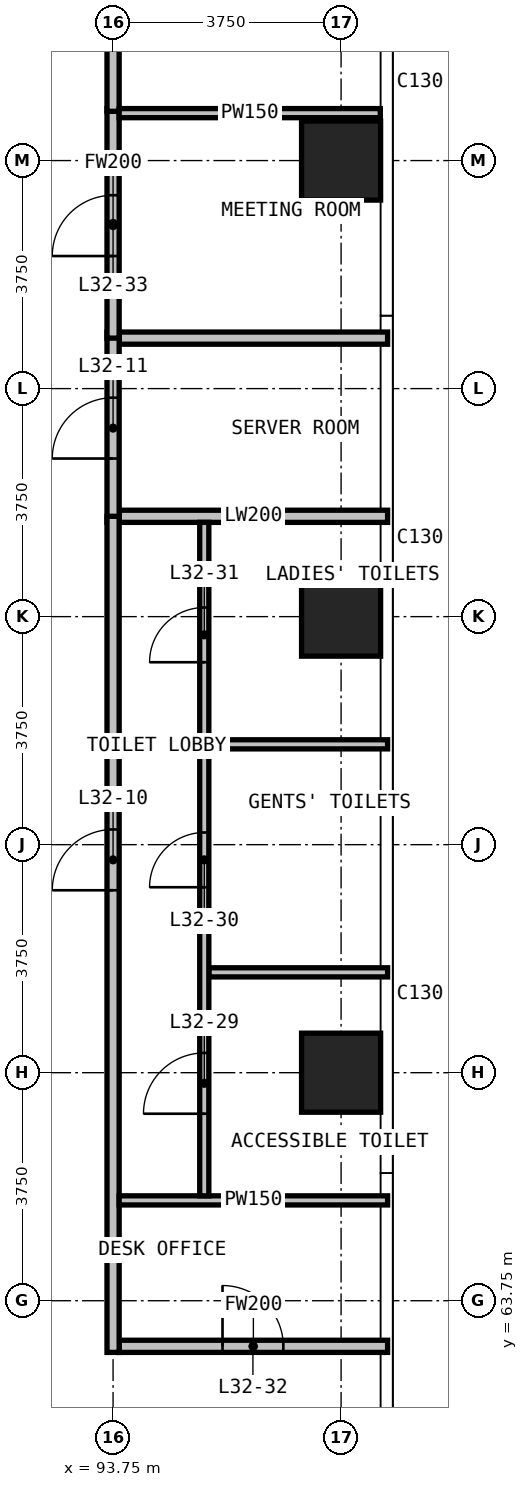
"""IFC4 building model, lengths in metres.
Left out: names, types, materials, properties, quantities, classifications, styles, units other than length and angle.
Written with IfcOpenShell. Run it as: python <this file> out.ifc"""

import sys

from ifc_helpers import new_model, si_unit, direction, frame, frame_2d, origin, origin_2d, place, context, subcontext, project, spatial, rectangle, extrude, element, fill, save


model = new_model("IFC4")
c1 = context("Model", 3, precision=1e-05, world=origin(), true_north=direction((0.0, 1.0)))
c2 = subcontext(c1, "Body", "Model", "MODEL_VIEW")
j1 = project(units=[si_unit("LENGTHUNIT", "METRE"), si_unit("PLANEANGLEUNIT", "RADIAN")], contexts=[c1])
p1 = place(None, origin())
s1 = spatial("IfcSite", under=j1, at=p1, CompositionType="ELEMENT")
p2 = place(p1, origin())
s2 = spatial("IfcBuilding", under=s1, at=p2, CompositionType="ELEMENT")
p3 = place(p2, frame((0.0, 0.0, 128.8)))
s3 = spatial("IfcBuildingStorey", under=s2, at=p3, CompositionType="ELEMENT", Elevation=128.8)
for number, where, z_axis, x_axis in (
    (1, (97.5, 67.5, 0.0), (0.0, 0.0, 1.0), (1.0, 0.0, 0.0)),
    (2, (97.5, 75.0, 0.0), (0.0, 0.0, 1.0), (1.0, 0.0, 0.0)),
    (3, (97.5, 82.5, 0.0), (0.0, 0.0, 1.0), (1.0, 0.0, 0.0)),
):
    element("IfcColumn", number, at=place(p3, frame(where, z_axis=z_axis, x_axis=x_axis)), inside=s3, PredefinedType="COLUMN", context=c2, shape_type="SweptSolid", body=[
        extrude(rectangle(XDim=1.3, YDim=1.3, at=origin_2d()), origin(), (0.0, 0.0, 1.0), 3.6),
    ])
for number, where, z_axis, x_axis in (
    (4, (93.85, 76.65, 0.0), (0.0, 0.0, 1.0), (1.0, 0.0, 0.0)),
    (5, (93.85, 79.58, 0.0), (0.0, 0.0, 1.0), (1.0, 0.0, 0.0)),
):
    element("IfcWall", number, at=place(p3, frame(where, z_axis=z_axis, x_axis=x_axis)), inside=s3, PredefinedType="PARTITIONING", context=c2, shape_type="SweptSolid", body=[
        extrude(rectangle(XDim=4.415, YDim=0.2, at=frame_2d((2.208, 0.0))), origin(), (0.0, 0.0, 1.0), 3.3),
    ])
p4 = place(p3, frame((93.75, 76.55, 0.0), z_axis=(0.0, 0.0, 1.0), x_axis=(0.0, 1.0, 0.0)))
e6 = element("IfcWall", 6, at=p4, inside=s3, PredefinedType="PARTITIONING", context=c2, shape_type="SweptSolid", body=[
    extrude(rectangle(XDim=3.13, YDim=0.2, at=frame_2d((1.565, 0.0))), origin(), (0.0, 0.0, 1.0), 3.3),
])
p5 = place(p4, frame((1.05, 0.0, 0.0)))
e7 = element("IfcOpeningElement", 7, at=p5, cuts=e6, PredefinedType="OPENING", context=c2, shape_type="SweptSolid", body=[
    extrude(rectangle(XDim=1.0, YDim=2.2, at=frame_2d((0.5, 1.1))), frame((0.0, 0.11, 0.0), z_axis=(0.0, -1.0, 0.0), x_axis=(1.0, 0.0, 0.0)), (0.0, 0.0, 1.0), 0.22),
])
p6 = place(p3, frame((93.85, 63.0, 0.0), z_axis=(0.0, 0.0, 1.0), x_axis=(1.0, 0.0, 0.0)))
e8 = element("IfcWall", 8, at=p6, inside=s3, PredefinedType="PARTITIONING", context=c2, shape_type="SweptSolid", body=[
    extrude(rectangle(XDim=4.415, YDim=0.2, at=frame_2d((2.208, 0.0))), origin(), (0.0, 0.0, 1.0), 3.3),
])
p7 = place(p6, frame((1.7, 0.0, 0.0)))
e9 = element("IfcOpeningElement", 9, at=p7, cuts=e8, PredefinedType="OPENING", context=c2, shape_type="SweptSolid", body=[
    extrude(rectangle(XDim=1.0, YDim=2.2, at=frame_2d((0.5, 1.1))), frame((0.0, 0.11, 0.0), z_axis=(0.0, -1.0, 0.0), x_axis=(1.0, 0.0, 0.0)), (0.0, 0.0, 1.0), 0.22),
])
p8 = place(p3, frame((93.75, 62.9, 0.0), z_axis=(0.0, 0.0, 1.0), x_axis=(0.0, 1.0, 0.0)))
e10 = element("IfcWall", 10, at=p8, inside=s3, PredefinedType="PARTITIONING", context=c2, shape_type="SweptSolid", body=[
    extrude(rectangle(XDim=13.75, YDim=0.2, at=frame_2d((6.875, 0.0))), origin(), (0.0, 0.0, 1.0), 3.3),
])
p9 = place(p8, frame((7.6, 0.0, 0.0)))
e11 = element("IfcOpeningElement", 11, at=p9, cuts=e10, PredefinedType="OPENING", context=c2, shape_type="SweptSolid", body=[
    extrude(rectangle(XDim=1.0, YDim=2.2, at=frame_2d((0.5, 1.1))), frame((0.0, 0.11, 0.0), z_axis=(0.0, -1.0, 0.0), x_axis=(1.0, 0.0, 0.0)), (0.0, 0.0, 1.0), 0.22),
])
p10 = place(p3, frame((93.75, 79.58, 0.0), z_axis=(0.0, 0.0, 1.0), x_axis=(0.0, 1.0, 0.0)))
e12 = element("IfcWall", 12, at=p10, inside=s3, PredefinedType="PARTITIONING", context=c2, shape_type="SweptSolid", body=[
    extrude(rectangle(XDim=3.775, YDim=0.2, at=frame_2d((1.887, 0.0))), origin(), (0.0, 0.0, 1.0), 3.3),
])
p11 = place(p10, frame((1.35, 0.0, 0.0)))
e13 = element("IfcOpeningElement", 13, at=p11, cuts=e12, PredefinedType="OPENING", context=c2, shape_type="SweptSolid", body=[
    extrude(rectangle(XDim=1.0, YDim=2.2, at=frame_2d((0.5, 1.1))), frame((0.0, 0.11, 0.0), z_axis=(0.0, -1.0, 0.0), x_axis=(1.0, 0.0, 0.0)), (0.0, 0.0, 1.0), 0.22),
])
p12 = place(p3, frame((93.75, 83.31, 0.0), z_axis=(0.0, 0.0, 1.0), x_axis=(0.0, 1.0, 0.0)))
e14 = element("IfcWall", 14, at=p12, inside=s3, PredefinedType="PARTITIONING", context=c2, shape_type="SweptSolid", body=[
    extrude(rectangle(XDim=7.335, YDim=0.2, at=frame_2d((3.667, 0.0))), origin(), (0.0, 0.0, 1.0), 3.3),
])
p13 = place(p3, frame((93.85, 65.4, 0.0), z_axis=(0.0, 0.0, 1.0), x_axis=(1.0, 0.0, 0.0)))
e15 = element("IfcWall", 15, at=p13, inside=s3, PredefinedType="PARTITIONING", context=c2, shape_type="SweptSolid", body=[
    extrude(rectangle(XDim=4.415, YDim=0.15, at=frame_2d((2.208, 0.0))), origin(), (0.0, 0.0, 1.0), 3.3),
])
for number, where, z_axis, x_axis in (
    (16, (95.325, 69.15, 0.0), (0.0, 0.0, 1.0), (1.0, 0.0, 0.0)),
    (17, (95.325, 72.9, 0.0), (0.0, 0.0, 1.0), (1.0, 0.0, 0.0)),
):
    element("IfcWall", number, at=place(p3, frame(where, z_axis=z_axis, x_axis=x_axis)), inside=s3, PredefinedType="PARTITIONING", context=c2, shape_type="SweptSolid", body=[
        extrude(rectangle(XDim=2.94, YDim=0.15, at=frame_2d((1.47, 0.0))), origin(), (0.0, 0.0, 1.0), 3.3),
    ])
p14 = place(p3, frame((93.85, 83.28, 0.0), z_axis=(0.0, 0.0, 1.0), x_axis=(1.0, 0.0, 0.0)))
e18 = element("IfcWall", 18, at=p14, inside=s3, PredefinedType="PARTITIONING", context=c2, shape_type="SweptSolid", body=[
    extrude(rectangle(XDim=4.295, YDim=0.15, at=frame_2d((2.147, 0.0))), origin(), (0.0, 0.0, 1.0), 3.3),
])
p15 = place(p3, frame((95.25, 65.475, 0.0), z_axis=(0.0, 0.0, 1.0), x_axis=(0.0, 1.0, 0.0)))
e19 = element("IfcWall", 19, at=p15, inside=s3, PredefinedType="PARTITIONING", context=c2, shape_type="SweptSolid", body=[
    extrude(rectangle(XDim=11.075, YDim=0.15, at=frame_2d((5.538, 0.0))), origin(), (0.0, 0.0, 1.0), 3.3),
])
p16 = place(p15, frame((1.35, 0.0, 0.0)))
e20 = element("IfcOpeningElement", 20, at=p16, cuts=e19, PredefinedType="OPENING", context=c2, shape_type="SweptSolid", body=[
    extrude(rectangle(XDim=1.0, YDim=2.2, at=frame_2d((0.5, 1.1))), frame((0.0, 0.085, 0.0), z_axis=(0.0, -1.0, 0.0), x_axis=(1.0, 0.0, 0.0)), (0.0, 0.0, 1.0), 0.17),
])
p17 = place(p15, frame((5.075, 0.0, 0.0)))
e21 = element("IfcOpeningElement", 21, at=p17, cuts=e19, PredefinedType="OPENING", context=c2, shape_type="SweptSolid", body=[
    extrude(rectangle(XDim=0.9, YDim=2.2, at=frame_2d((0.45, 1.1))), frame((0.0, 0.085, 0.0), z_axis=(0.0, -1.0, 0.0), x_axis=(1.0, 0.0, 0.0)), (0.0, 0.0, 1.0), 0.17),
])
p18 = place(p15, frame((8.775, 0.0, 0.0)))
e22 = element("IfcOpeningElement", 22, at=p18, cuts=e19, PredefinedType="OPENING", context=c2, shape_type="SweptSolid", body=[
    extrude(rectangle(XDim=0.9, YDim=2.2, at=frame_2d((0.45, 1.1))), frame((0.0, 0.085, 0.0), z_axis=(0.0, -1.0, 0.0), x_axis=(1.0, 0.0, 0.0)), (0.0, 0.0, 1.0), 0.17),
])
p19 = place(p9, origin())
e23 = element("IfcDoor", 23, at=p19, inside=s3, OperationType="SINGLE_SWING_LEFT", PredefinedType="DOOR", context=c2, shape_type="SweptSolid", body=[
    extrude(rectangle(XDim=1.0, YDim=2.2, at=frame_2d((0.5, 1.1))), frame((0.0, 0.025, 0.0), z_axis=(0.0, -1.0, 0.0), x_axis=(1.0, 0.0, 0.0)), (0.0, 0.0, 1.0), 0.05),
])
fill(e11, e23)
p20 = place(p5, origin())
e24 = element("IfcDoor", 24, at=p20, inside=s3, OperationType="SINGLE_SWING_RIGHT", PredefinedType="DOOR", context=c2, shape_type="SweptSolid", body=[
    extrude(rectangle(XDim=1.0, YDim=2.2, at=frame_2d((0.5, 1.1))), frame((0.0, 0.025, 0.0), z_axis=(0.0, -1.0, 0.0), x_axis=(1.0, 0.0, 0.0)), (0.0, 0.0, 1.0), 0.05),
])
fill(e7, e24)
p21 = place(p16, origin())
e25 = element("IfcDoor", 25, at=p21, inside=s3, OperationType="SINGLE_SWING_RIGHT", PredefinedType="DOOR", context=c2, shape_type="SweptSolid", body=[
    extrude(rectangle(XDim=1.0, YDim=2.2, at=frame_2d((0.5, 1.1))), frame((0.0, 0.025, 0.0), z_axis=(0.0, -1.0, 0.0), x_axis=(1.0, 0.0, 0.0)), (0.0, 0.0, 1.0), 0.05),
])
fill(e20, e25)
p22 = place(p17, origin())
e26 = element("IfcDoor", 26, at=p22, inside=s3, OperationType="SINGLE_SWING_LEFT", PredefinedType="DOOR", context=c2, shape_type="SweptSolid", body=[
    extrude(rectangle(XDim=0.9, YDim=2.2, at=frame_2d((0.45, 1.1))), frame((0.0, 0.025, 0.0), z_axis=(0.0, -1.0, 0.0), x_axis=(1.0, 0.0, 0.0)), (0.0, 0.0, 1.0), 0.05),
])
fill(e21, e26)
p23 = place(p18, origin())
e27 = element("IfcDoor", 27, at=p23, inside=s3, OperationType="SINGLE_SWING_RIGHT", PredefinedType="DOOR", context=c2, shape_type="SweptSolid", body=[
    extrude(rectangle(XDim=0.9, YDim=2.2, at=frame_2d((0.45, 1.1))), frame((0.0, 0.025, 0.0), z_axis=(0.0, -1.0, 0.0), x_axis=(1.0, 0.0, 0.0)), (0.0, 0.0, 1.0), 0.05),
])
fill(e22, e27)
p24 = place(p7, origin())
e28 = element("IfcDoor", 28, at=p24, inside=s3, OperationType="SINGLE_SWING_LEFT", PredefinedType="DOOR", context=c2, shape_type="SweptSolid", body=[
    extrude(rectangle(XDim=1.0, YDim=2.2, at=frame_2d((0.5, 1.1))), frame((0.0, 0.025, 0.0), z_axis=(0.0, -1.0, 0.0), x_axis=(1.0, 0.0, 0.0)), (0.0, 0.0, 1.0), 0.05),
])
fill(e9, e28)
p25 = place(p11, origin())
e29 = element("IfcDoor", 29, at=p25, inside=s3, OperationType="SINGLE_SWING_LEFT", PredefinedType="DOOR", context=c2, shape_type="SweptSolid", body=[
    extrude(rectangle(XDim=1.0, YDim=2.2, at=frame_2d((0.5, 1.1))), frame((0.0, 0.025, 0.0), z_axis=(0.0, -1.0, 0.0), x_axis=(1.0, 0.0, 0.0)), (0.0, 0.0, 1.0), 0.05),
])
fill(e13, e29)
save(model, sys.argv[1])
